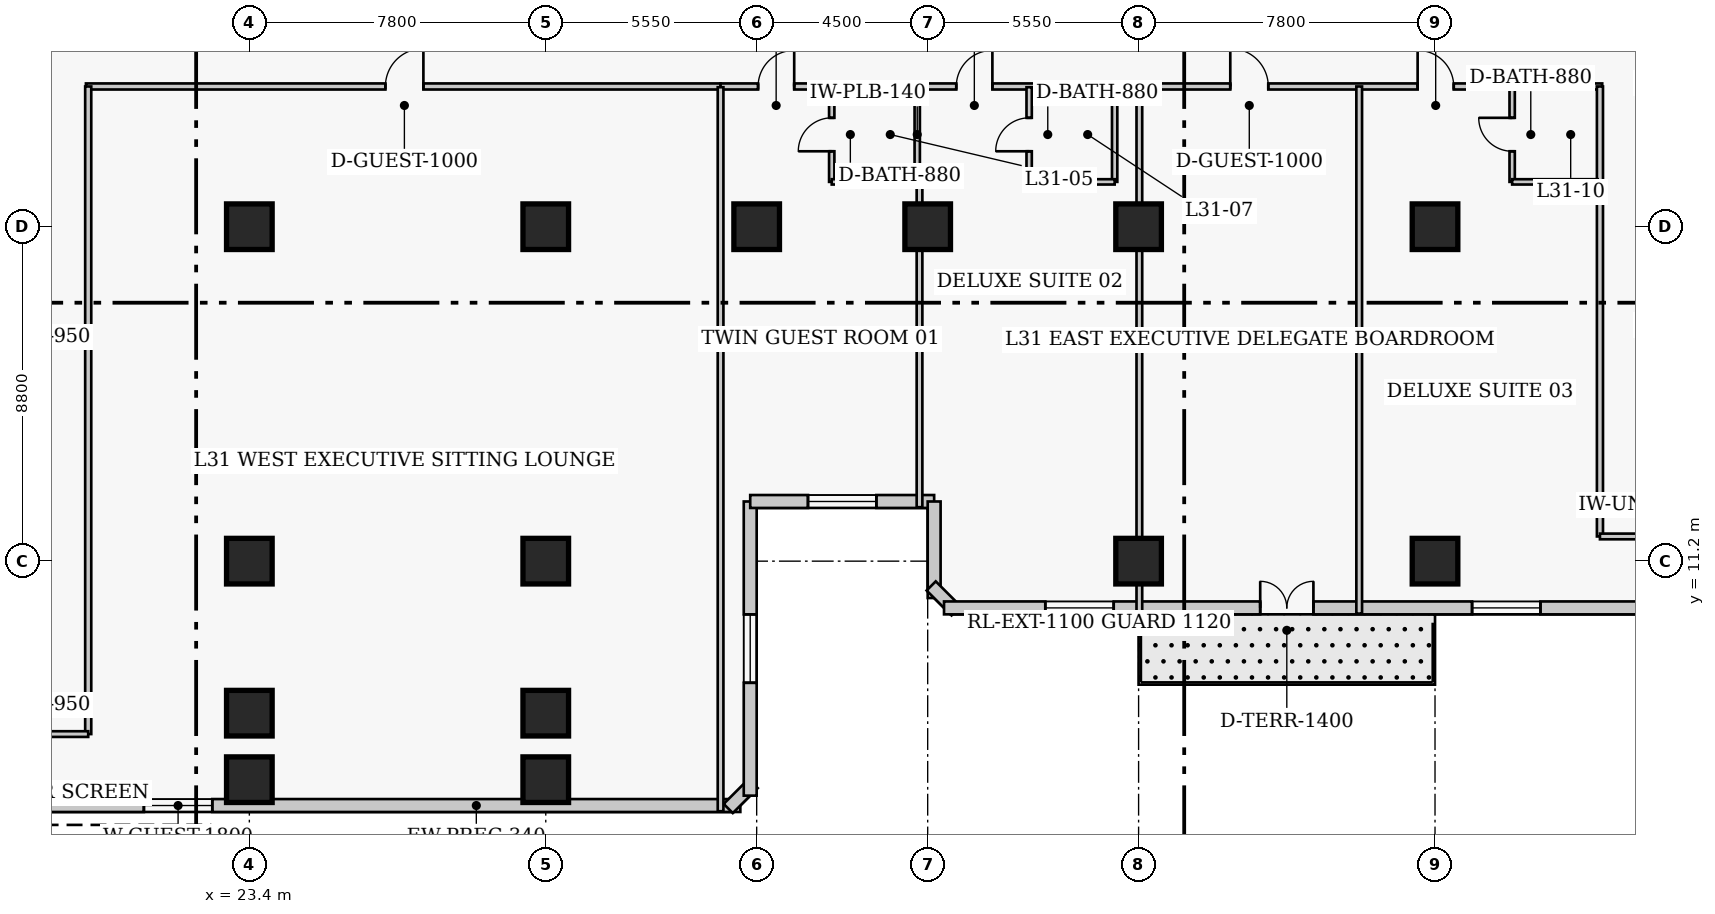
"""IFC4 building model, lengths in metres.
Left out: names, types, materials, properties, quantities, classifications, styles, units other than length and angle.
Written with IfcOpenShell. Run it as: python <this file> out.ifc"""

import sys

from ifc_helpers import new_model, si_unit, direction, frame, frame_2d, origin, origin_2d, place, context, subcontext, project, spatial, rectangle, extrude, element, fill, save


model = new_model("IFC4")
c1 = context("Model", 3, precision=1e-05, world=origin(), true_north=direction((0.0, 1.0)))
c2 = subcontext(c1, "Body", "Model", "MODEL_VIEW")
j1 = project(units=[si_unit("LENGTHUNIT", "METRE"), si_unit("PLANEANGLEUNIT", "RADIAN")], contexts=[c1])
p1 = place(None, origin())
s1 = spatial("IfcSite", under=j1, at=p1, CompositionType="ELEMENT")
p2 = place(p1, origin())
s2 = spatial("IfcBuilding", under=s1, at=p2, CompositionType="ELEMENT")
p3 = place(p2, frame((0.0, 0.0, 126.0)))
s3 = spatial("IfcBuildingStorey", under=s2, at=p3, CompositionType="ELEMENT", Elevation=126.0)
for number, where, z_axis, x_axis in (
    (1, (23.4, 11.2, 0.0), (0.0, 0.0, 1.0), (1.0, 0.0, 0.0)),
    (2, (23.4, 20.0, 0.0), (0.0, 0.0, 1.0), (1.0, 0.0, 0.0)),
    (3, (31.2, 11.2, 0.0), (0.0, 0.0, 1.0), (1.0, 0.0, 0.0)),
    (4, (31.2, 20.0, 0.0), (0.0, 0.0, 1.0), (1.0, 0.0, 0.0)),
    (5, (36.75, 20.0, 0.0), (0.0, 0.0, 1.0), (1.0, 0.0, 0.0)),
    (6, (41.25, 20.0, 0.0), (0.0, 0.0, 1.0), (1.0, 0.0, 0.0)),
    (7, (46.8, 11.2, 0.0), (0.0, 0.0, 1.0), (1.0, 0.0, 0.0)),
    (8, (46.8, 20.0, 0.0), (0.0, 0.0, 1.0), (1.0, 0.0, 0.0)),
    (9, (54.6, 11.2, 0.0), (0.0, 0.0, 1.0), (1.0, 0.0, 0.0)),
    (10, (54.6, 20.0, 0.0), (0.0, 0.0, 1.0), (1.0, 0.0, 0.0)),
    (11, (23.4, 7.2, 0.0), (0.0, 0.0, 1.0), (1.0, 0.0, 0.0)),
    (12, (31.2, 7.2, 0.0), (0.0, 0.0, 1.0), (1.0, 0.0, 0.0)),
    (13, (23.4, 5.45, 0.0), (0.0, 0.0, 1.0), (1.0, 0.0, 0.0)),
    (14, (31.2, 5.45, 0.0), (0.0, 0.0, 1.0), (1.0, 0.0, 0.0)),
):
    element("IfcColumn", number, at=place(p3, frame(where, z_axis=z_axis, x_axis=x_axis)), inside=s3, PredefinedType="COLUMN", context=c2, shape_type="SweptSolid", body=[
        extrude(rectangle(XDim=1.2, YDim=1.2, at=origin_2d()), origin(), (0.0, 0.0, 1.0), 3.8),
    ])
p4 = place(p3, frame((8.03, 4.77, 0.0), z_axis=(0.0, 0.0, 1.0), x_axis=(1.0, 0.0, 0.0)))
e15 = element("IfcWall", 15, at=p4, inside=s3, PredefinedType="SOLIDWALL", context=c2, shape_type="SweptSolid", body=[
    extrude(rectangle(XDim=28.29, YDim=0.34, at=frame_2d((14.145, 0.0))), origin(), (0.0, 0.0, 1.0), 3.46),
])
p5 = place(p4, frame((12.595, 0.0, 0.85)))
e16 = element("IfcOpeningElement", 16, at=p5, cuts=e15, PredefinedType="OPENING", context=c2, shape_type="SweptSolid", body=[
    extrude(rectangle(XDim=1.8, YDim=1.8, at=frame_2d((0.9, 0.9))), frame((0.0, 0.18, 0.0), z_axis=(0.0, -1.0, 0.0), x_axis=(1.0, 0.0, 0.0)), (0.0, 0.0, 1.0), 0.36),
])
p6 = place(p3, frame((36.001, 4.692, 0.0), z_axis=(0.0, 0.0, 1.0), x_axis=(0.707238225886, 0.706975312048, 0.0)))
e17 = element("IfcWall", 17, at=p6, inside=s3, PredefinedType="SOLIDWALL", context=c2, shape_type="SweptSolid", body=[
    extrude(rectangle(XDim=0.929, YDim=0.34, at=frame_2d((0.464, 0.0))), origin(), (0.0, 0.0, 1.0), 3.46),
])
p7 = place(p3, frame((36.58, 5.03, 0.0), z_axis=(0.0, 0.0, 1.0), x_axis=(0.0, 1.0, 0.0)))
e18 = element("IfcWall", 18, at=p7, inside=s3, PredefinedType="SOLIDWALL", context=c2, shape_type="SweptSolid", body=[
    extrude(rectangle(XDim=7.74, YDim=0.34, at=frame_2d((3.87, 0.0))), origin(), (0.0, 0.0, 1.0), 3.46),
])
p8 = place(p7, frame((2.97, 0.0, 0.85)))
e19 = element("IfcOpeningElement", 19, at=p8, cuts=e18, PredefinedType="OPENING", context=c2, shape_type="SweptSolid", body=[
    extrude(rectangle(XDim=1.8, YDim=1.8, at=frame_2d((0.9, 0.9))), frame((0.0, 0.18, 0.0), z_axis=(0.0, -1.0, 0.0), x_axis=(1.0, 0.0, 0.0)), (0.0, 0.0, 1.0), 0.36),
])
p9 = place(p3, frame((36.58, 12.77, 0.0), z_axis=(0.0, 0.0, 1.0), x_axis=(1.0, 0.0, 0.0)))
e20 = element("IfcWall", 20, at=p9, inside=s3, PredefinedType="SOLIDWALL", context=c2, shape_type="SweptSolid", body=[
    extrude(rectangle(XDim=4.84, YDim=0.34, at=frame_2d((2.42, 0.0))), origin(), (0.0, 0.0, 1.0), 3.46),
])
p10 = place(p9, frame((1.52, 0.0, 0.85)))
e21 = element("IfcOpeningElement", 21, at=p10, cuts=e20, PredefinedType="OPENING", context=c2, shape_type="SweptSolid", body=[
    extrude(rectangle(XDim=1.8, YDim=1.8, at=frame_2d((0.9, 0.9))), frame((0.0, 0.18, 0.0), z_axis=(0.0, -1.0, 0.0), x_axis=(1.0, 0.0, 0.0)), (0.0, 0.0, 1.0), 0.36),
])
p11 = place(p3, frame((41.42, 12.77, 0.0), z_axis=(0.0, 0.0, 1.0), x_axis=(0.0, -1.0, 0.0)))
e22 = element("IfcWall", 22, at=p11, inside=s3, PredefinedType="SOLIDWALL", context=c2, shape_type="SweptSolid", body=[
    extrude(rectangle(XDim=2.54, YDim=0.34, at=frame_2d((1.27, 0.0))), origin(), (0.0, 0.0, 1.0), 3.46),
])
p12 = place(p3, frame((41.342, 10.549, 0.0), z_axis=(0.0, 0.0, 1.0), x_axis=(0.707106781187, -0.707106781187, 0.0)))
e23 = element("IfcWall", 23, at=p12, inside=s3, PredefinedType="SOLIDWALL", context=c2, shape_type="SweptSolid", body=[
    extrude(rectangle(XDim=0.929, YDim=0.34, at=frame_2d((0.464, 0.0))), origin(), (0.0, 0.0, 1.0), 3.46),
])
p13 = place(p3, frame((41.68, 9.97, 0.0), z_axis=(0.0, 0.0, 1.0), x_axis=(1.0, 0.0, 0.0)))
e24 = element("IfcWall", 24, at=p13, inside=s3, PredefinedType="SOLIDWALL", context=c2, shape_type="SweptSolid", body=[
    extrude(rectangle(XDim=28.29, YDim=0.34, at=frame_2d((14.145, 0.0))), origin(), (0.0, 0.0, 1.0), 3.46),
])
p14 = place(p13, frame((8.32, 0.0, 0.0)))
e25 = element("IfcOpeningElement", 25, at=p14, cuts=e24, PredefinedType="OPENING", context=c2, shape_type="SweptSolid", body=[
    extrude(rectangle(XDim=1.4, YDim=2.15, at=frame_2d((0.7, 1.075))), frame((0.0, 0.18, 0.0), z_axis=(0.0, -1.0, 0.0), x_axis=(1.0, 0.0, 0.0)), (0.0, 0.0, 1.0), 0.36),
])
p15 = place(p13, frame((2.665, 0.0, 0.85)))
e26 = element("IfcOpeningElement", 26, at=p15, cuts=e24, PredefinedType="OPENING", context=c2, shape_type="SweptSolid", body=[
    extrude(rectangle(XDim=1.8, YDim=1.8, at=frame_2d((0.9, 0.9))), frame((0.0, 0.18, 0.0), z_axis=(0.0, -1.0, 0.0), x_axis=(1.0, 0.0, 0.0)), (0.0, 0.0, 1.0), 0.36),
])
p16 = place(p13, frame((13.895, 0.0, 0.85)))
e27 = element("IfcOpeningElement", 27, at=p16, cuts=e24, PredefinedType="OPENING", context=c2, shape_type="SweptSolid", body=[
    extrude(rectangle(XDim=1.8, YDim=1.8, at=frame_2d((0.9, 0.9))), frame((0.0, 0.18, 0.0), z_axis=(0.0, -1.0, 0.0), x_axis=(1.0, 0.0, 0.0)), (0.0, 0.0, 1.0), 0.36),
])
p17 = place(p3, frame((19.1, 23.69, 0.0), z_axis=(0.0, 0.0, 1.0), x_axis=(1.0, 0.0, 0.0)))
e28 = element("IfcWall", 28, at=p17, inside=s3, PredefinedType="PARTITIONING", context=c2, shape_type="SweptSolid", body=[
    extrude(rectangle(XDim=16.7, YDim=0.16, at=frame_2d((8.35, 0.0))), origin(), (0.0, 0.0, 1.0), 3.46),
])
p18 = place(p17, frame((7.88, 0.0, 0.0)))
e29 = element("IfcOpeningElement", 29, at=p18, cuts=e28, PredefinedType="OPENING", context=c2, shape_type="SweptSolid", body=[
    extrude(rectangle(XDim=1.0, YDim=2.15, at=frame_2d((0.5, 1.075))), frame((0.0, 0.09, 0.0), z_axis=(0.0, -1.0, 0.0), x_axis=(1.0, 0.0, 0.0)), (0.0, 0.0, 1.0), 0.18),
])
p19 = place(p3, frame((35.8, 23.69, 0.0), z_axis=(0.0, 0.0, 1.0), x_axis=(1.0, 0.0, 0.0)))
e30 = element("IfcWall", 30, at=p19, inside=s3, PredefinedType="PARTITIONING", context=c2, shape_type="SweptSolid", body=[
    extrude(rectangle(XDim=23.2, YDim=0.16, at=frame_2d((11.6, 0.0))), origin(), (0.0, 0.0, 1.0), 3.46),
])
p20 = place(p19, frame((0.988, 0.0, 0.0)))
e31 = element("IfcOpeningElement", 31, at=p20, cuts=e30, PredefinedType="OPENING", context=c2, shape_type="SweptSolid", body=[
    extrude(rectangle(XDim=0.95, YDim=2.1, at=frame_2d((0.475, 1.05))), frame((0.0, 0.09, 0.0), z_axis=(0.0, -1.0, 0.0), x_axis=(1.0, 0.0, 0.0)), (0.0, 0.0, 1.0), 0.18),
])
p21 = place(p19, frame((6.202, 0.0, 0.0)))
e32 = element("IfcOpeningElement", 32, at=p21, cuts=e30, PredefinedType="OPENING", context=c2, shape_type="SweptSolid", body=[
    extrude(rectangle(XDim=0.95, YDim=2.1, at=frame_2d((0.475, 1.05))), frame((0.0, 0.09, 0.0), z_axis=(0.0, -1.0, 0.0), x_axis=(1.0, 0.0, 0.0)), (0.0, 0.0, 1.0), 0.18),
])
p22 = place(p19, frame((13.413, 0.0, 0.0)))
e33 = element("IfcOpeningElement", 33, at=p22, cuts=e30, PredefinedType="OPENING", context=c2, shape_type="SweptSolid", body=[
    extrude(rectangle(XDim=1.0, YDim=2.15, at=frame_2d((0.5, 1.075))), frame((0.0, 0.09, 0.0), z_axis=(0.0, -1.0, 0.0), x_axis=(1.0, 0.0, 0.0)), (0.0, 0.0, 1.0), 0.18),
])
p23 = place(p19, frame((18.343, 0.0, 0.0)))
e34 = element("IfcOpeningElement", 34, at=p23, cuts=e30, PredefinedType="OPENING", context=c2, shape_type="SweptSolid", body=[
    extrude(rectangle(XDim=0.95, YDim=2.1, at=frame_2d((0.475, 1.05))), frame((0.0, 0.09, 0.0), z_axis=(0.0, -1.0, 0.0), x_axis=(1.0, 0.0, 0.0)), (0.0, 0.0, 1.0), 0.18),
])
p24 = place(p3, frame((19.16, 6.65, 0.0), z_axis=(0.0, 0.0, 1.0), x_axis=(0.0, 1.0, 0.0)))
e35 = element("IfcWall", 35, at=p24, inside=s3, PredefinedType="PARTITIONING", context=c2, shape_type="SweptSolid", body=[
    extrude(rectangle(XDim=17.04, YDim=0.16, at=frame_2d((8.52, 0.0))), origin(), (0.0, 0.0, 1.0), 3.46),
])
p25 = place(p3, frame((58.94, 11.85, 0.0), z_axis=(0.0, 0.0, 1.0), x_axis=(0.0, 1.0, 0.0)))
e36 = element("IfcWall", 36, at=p25, inside=s3, PredefinedType="PARTITIONING", context=c2, shape_type="SweptSolid", body=[
    extrude(rectangle(XDim=11.84, YDim=0.16, at=frame_2d((5.92, 0.0))), origin(), (0.0, 0.0, 1.0), 3.46),
])
for number, where, z_axis, x_axis in (
    (37, (58.94, 11.85, 0.0), (0.0, 0.0, 1.0), (1.0, 0.0, 0.0)),
    (38, (16.94, 6.65, 0.0), (0.0, 0.0, 1.0), (1.0, 0.0, 0.0)),
):
    element("IfcWall", number, at=place(p3, frame(where, z_axis=z_axis, x_axis=x_axis)), inside=s3, PredefinedType="PARTITIONING", context=c2, shape_type="SweptSolid", body=[
        extrude(rectangle(XDim=2.22, YDim=0.15, at=frame_2d((1.11, 0.0))), origin(), (0.0, 0.0, 1.0), 3.46),
    ])
p26 = place(p3, frame((35.8, 4.62, 0.0), z_axis=(0.0, 0.0, 1.0), x_axis=(0.0, 1.0, 0.0)))
e39 = element("IfcWall", 39, at=p26, inside=s3, PredefinedType="PARTITIONING", context=c2, shape_type="SweptSolid", body=[
    extrude(rectangle(XDim=19.05, YDim=0.15, at=frame_2d((9.525, 0.0))), origin(), (0.0, 0.0, 1.0), 3.46),
])
p27 = place(p3, frame((38.725, 21.18, 0.0), z_axis=(0.0, 0.0, 1.0), x_axis=(0.0, 1.0, 0.0)))
e40 = element("IfcWall", 40, at=p27, inside=s3, PredefinedType="PLUMBINGWALL", context=c2, shape_type="SweptSolid", body=[
    extrude(rectangle(XDim=2.49, YDim=0.14, at=frame_2d((1.245, 0.0))), origin(), (0.0, 0.0, 1.0), 3.46),
])
p28 = place(p27, frame((0.805, 0.0, 0.0)))
e41 = element("IfcOpeningElement", 41, at=p28, cuts=e40, PredefinedType="OPENING", context=c2, shape_type="SweptSolid", body=[
    extrude(rectangle(XDim=0.88, YDim=2.05, at=frame_2d((0.44, 1.025))), frame((0.0, 0.08, 0.0), z_axis=(0.0, -1.0, 0.0), x_axis=(1.0, 0.0, 0.0)), (0.0, 0.0, 1.0), 0.16),
])
p29 = place(p3, frame((40.975, 21.18, 0.0), z_axis=(0.0, 0.0, 1.0), x_axis=(0.0, 1.0, 0.0)))
e42 = element("IfcWall", 42, at=p29, inside=s3, PredefinedType="PLUMBINGWALL", context=c2, shape_type="SweptSolid", body=[
    extrude(rectangle(XDim=2.49, YDim=0.14, at=frame_2d((1.245, 0.0))), origin(), (0.0, 0.0, 1.0), 3.46),
])
p30 = place(p3, frame((38.725, 21.18, 0.0), z_axis=(0.0, 0.0, 1.0), x_axis=(1.0, 0.0, 0.0)))
e43 = element("IfcWall", 43, at=p30, inside=s3, PredefinedType="PLUMBINGWALL", context=c2, shape_type="SweptSolid", body=[
    extrude(rectangle(XDim=2.25, YDim=0.14, at=frame_2d((1.125, 0.0))), origin(), (0.0, 0.0, 1.0), 3.46),
])
p31 = place(p3, frame((41.035, 12.62, 0.0), z_axis=(0.0, 0.0, 1.0), x_axis=(0.0, 1.0, 0.0)))
e44 = element("IfcWall", 44, at=p31, inside=s3, PredefinedType="PARTITIONING", context=c2, shape_type="SweptSolid", body=[
    extrude(rectangle(XDim=8.56, YDim=0.15, at=frame_2d((4.28, 0.0))), origin(), (0.0, 0.0, 1.0), 3.46),
])
p32 = place(p3, frame((43.92, 21.18, 0.0), z_axis=(0.0, 0.0, 1.0), x_axis=(0.0, 1.0, 0.0)))
e45 = element("IfcWall", 45, at=p32, inside=s3, PredefinedType="PLUMBINGWALL", context=c2, shape_type="SweptSolid", body=[
    extrude(rectangle(XDim=2.49, YDim=0.14, at=frame_2d((1.245, 0.0))), origin(), (0.0, 0.0, 1.0), 3.46),
])
p33 = place(p32, frame((0.805, 0.0, 0.0)))
e46 = element("IfcOpeningElement", 46, at=p33, cuts=e45, PredefinedType="OPENING", context=c2, shape_type="SweptSolid", body=[
    extrude(rectangle(XDim=0.88, YDim=2.05, at=frame_2d((0.44, 1.025))), frame((0.0, 0.08, 0.0), z_axis=(0.0, -1.0, 0.0), x_axis=(1.0, 0.0, 0.0)), (0.0, 0.0, 1.0), 0.16),
])
p34 = place(p3, frame((46.17, 21.18, 0.0), z_axis=(0.0, 0.0, 1.0), x_axis=(0.0, 1.0, 0.0)))
e47 = element("IfcWall", 47, at=p34, inside=s3, PredefinedType="PLUMBINGWALL", context=c2, shape_type="SweptSolid", body=[
    extrude(rectangle(XDim=2.49, YDim=0.14, at=frame_2d((1.245, 0.0))), origin(), (0.0, 0.0, 1.0), 3.46),
])
p35 = place(p3, frame((43.92, 21.18, 0.0), z_axis=(0.0, 0.0, 1.0), x_axis=(1.0, 0.0, 0.0)))
e48 = element("IfcWall", 48, at=p35, inside=s3, PredefinedType="PLUMBINGWALL", context=c2, shape_type="SweptSolid", body=[
    extrude(rectangle(XDim=2.25, YDim=0.14, at=frame_2d((1.125, 0.0))), origin(), (0.0, 0.0, 1.0), 3.46),
])
p36 = place(p3, frame((46.82, 9.82, 0.0), z_axis=(0.0, 0.0, 1.0), x_axis=(0.0, 1.0, 0.0)))
e49 = element("IfcWall", 49, at=p36, inside=s3, PredefinedType="PARTITIONING", context=c2, shape_type="SweptSolid", body=[
    extrude(rectangle(XDim=13.87, YDim=0.15, at=frame_2d((6.935, 0.0))), origin(), (0.0, 0.0, 1.0), 2.599),
])
p37 = place(p3, frame((52.605, 9.82, 0.0), z_axis=(0.0, 0.0, 1.0), x_axis=(0.0, 1.0, 0.0)))
e50 = element("IfcWall", 50, at=p37, inside=s3, PredefinedType="PARTITIONING", context=c2, shape_type="SweptSolid", body=[
    extrude(rectangle(XDim=13.87, YDim=0.15, at=frame_2d((6.935, 0.0))), origin(), (0.0, 0.0, 1.0), 3.46),
])
p38 = place(p3, frame((56.63, 21.18, 0.0), z_axis=(0.0, 0.0, 1.0), x_axis=(0.0, 1.0, 0.0)))
e51 = element("IfcWall", 51, at=p38, inside=s3, PredefinedType="PLUMBINGWALL", context=c2, shape_type="SweptSolid", body=[
    extrude(rectangle(XDim=2.49, YDim=0.14, at=frame_2d((1.245, 0.0))), origin(), (0.0, 0.0, 1.0), 3.46),
])
p39 = place(p38, frame((0.805, 0.0, 0.0)))
e52 = element("IfcOpeningElement", 52, at=p39, cuts=e51, PredefinedType="OPENING", context=c2, shape_type="SweptSolid", body=[
    extrude(rectangle(XDim=0.88, YDim=2.05, at=frame_2d((0.44, 1.025))), frame((0.0, 0.08, 0.0), z_axis=(0.0, -1.0, 0.0), x_axis=(1.0, 0.0, 0.0)), (0.0, 0.0, 1.0), 0.16),
])
p40 = place(p3, frame((56.63, 21.18, 0.0), z_axis=(0.0, 0.0, 1.0), x_axis=(1.0, 0.0, 0.0)))
e53 = element("IfcWall", 53, at=p40, inside=s3, PredefinedType="PLUMBINGWALL", context=c2, shape_type="SweptSolid", body=[
    extrude(rectangle(XDim=2.25, YDim=0.14, at=frame_2d((1.125, 0.0))), origin(), (0.0, 0.0, 1.0), 3.46),
])
p41 = place(p5, origin())
e54 = element("IfcWindow", 54, at=p41, inside=s3, PartitioningType="SINGLE_PANEL", PredefinedType="WINDOW", context=c2, shape_type="SweptSolid", body=[
    extrude(rectangle(XDim=1.8, YDim=1.8, at=frame_2d((0.9, 0.9))), frame((0.0, 0.03, 0.0), z_axis=(0.0, -1.0, 0.0), x_axis=(1.0, 0.0, 0.0)), (0.0, 0.0, 1.0), 0.06),
])
fill(e16, e54)
p42 = place(p8, origin())
e55 = element("IfcWindow", 55, at=p42, inside=s3, PartitioningType="SINGLE_PANEL", PredefinedType="WINDOW", context=c2, shape_type="SweptSolid", body=[
    extrude(rectangle(XDim=1.8, YDim=1.8, at=frame_2d((0.9, 0.9))), frame((0.0, 0.03, 0.0), z_axis=(0.0, -1.0, 0.0), x_axis=(1.0, 0.0, 0.0)), (0.0, 0.0, 1.0), 0.06),
])
fill(e19, e55)
p43 = place(p10, origin())
e56 = element("IfcWindow", 56, at=p43, inside=s3, PartitioningType="SINGLE_PANEL", PredefinedType="WINDOW", context=c2, shape_type="SweptSolid", body=[
    extrude(rectangle(XDim=1.8, YDim=1.8, at=frame_2d((0.9, 0.9))), frame((0.0, 0.03, 0.0), z_axis=(0.0, -1.0, 0.0), x_axis=(1.0, 0.0, 0.0)), (0.0, 0.0, 1.0), 0.06),
])
fill(e21, e56)
p44 = place(p14, origin())
e57 = element("IfcDoor", 57, at=p44, inside=s3, OperationType="DOUBLE_DOOR_SINGLE_SWING", PredefinedType="DOOR", context=c2, shape_type="SweptSolid", body=[
    extrude(rectangle(XDim=1.4, YDim=2.15, at=frame_2d((0.7, 1.075))), frame((0.0, 0.025, 0.0), z_axis=(0.0, -1.0, 0.0), x_axis=(1.0, 0.0, 0.0)), (0.0, 0.0, 1.0), 0.05),
])
fill(e25, e57)
p45 = place(p15, origin())
e58 = element("IfcWindow", 58, at=p45, inside=s3, PartitioningType="SINGLE_PANEL", PredefinedType="WINDOW", context=c2, shape_type="SweptSolid", body=[
    extrude(rectangle(XDim=1.8, YDim=1.8, at=frame_2d((0.9, 0.9))), frame((0.0, 0.03, 0.0), z_axis=(0.0, -1.0, 0.0), x_axis=(1.0, 0.0, 0.0)), (0.0, 0.0, 1.0), 0.06),
])
fill(e26, e58)
p46 = place(p16, origin())
e59 = element("IfcWindow", 59, at=p46, inside=s3, PartitioningType="SINGLE_PANEL", PredefinedType="WINDOW", context=c2, shape_type="SweptSolid", body=[
    extrude(rectangle(XDim=1.8, YDim=1.8, at=frame_2d((0.9, 0.9))), frame((0.0, 0.03, 0.0), z_axis=(0.0, -1.0, 0.0), x_axis=(1.0, 0.0, 0.0)), (0.0, 0.0, 1.0), 0.06),
])
fill(e27, e59)
p47 = place(p18, origin())
e60 = element("IfcDoor", 60, at=p47, inside=s3, OperationType="SINGLE_SWING_RIGHT", PredefinedType="DOOR", context=c2, shape_type="SweptSolid", body=[
    extrude(rectangle(XDim=1.0, YDim=2.15, at=frame_2d((0.5, 1.075))), frame((0.0, 0.025, 0.0), z_axis=(0.0, -1.0, 0.0), x_axis=(1.0, 0.0, 0.0)), (0.0, 0.0, 1.0), 0.05),
])
fill(e29, e60)
p48 = place(p28, origin())
e61 = element("IfcDoor", 61, at=p48, inside=s3, OperationType="SINGLE_SWING_LEFT", PredefinedType="DOOR", context=c2, shape_type="SweptSolid", body=[
    extrude(rectangle(XDim=0.88, YDim=2.05, at=frame_2d((0.44, 1.025))), frame((0.0, 0.025, 0.0), z_axis=(0.0, -1.0, 0.0), x_axis=(1.0, 0.0, 0.0)), (0.0, 0.0, 1.0), 0.05),
])
fill(e41, e61)
p49 = place(p20, origin())
e62 = element("IfcDoor", 62, at=p49, inside=s3, OperationType="SINGLE_SWING_RIGHT", PredefinedType="DOOR", context=c2, shape_type="SweptSolid", body=[
    extrude(rectangle(XDim=0.95, YDim=2.1, at=frame_2d((0.475, 1.05))), frame((0.0, 0.025, 0.0), z_axis=(0.0, -1.0, 0.0), x_axis=(1.0, 0.0, 0.0)), (0.0, 0.0, 1.0), 0.05),
])
fill(e31, e62)
p50 = place(p33, origin())
e63 = element("IfcDoor", 63, at=p50, inside=s3, OperationType="SINGLE_SWING_LEFT", PredefinedType="DOOR", context=c2, shape_type="SweptSolid", body=[
    extrude(rectangle(XDim=0.88, YDim=2.05, at=frame_2d((0.44, 1.025))), frame((0.0, 0.025, 0.0), z_axis=(0.0, -1.0, 0.0), x_axis=(1.0, 0.0, 0.0)), (0.0, 0.0, 1.0), 0.05),
])
fill(e46, e63)
p51 = place(p21, origin())
e64 = element("IfcDoor", 64, at=p51, inside=s3, OperationType="SINGLE_SWING_RIGHT", PredefinedType="DOOR", context=c2, shape_type="SweptSolid", body=[
    extrude(rectangle(XDim=0.95, YDim=2.1, at=frame_2d((0.475, 1.05))), frame((0.0, 0.025, 0.0), z_axis=(0.0, -1.0, 0.0), x_axis=(1.0, 0.0, 0.0)), (0.0, 0.0, 1.0), 0.05),
])
fill(e32, e64)
p52 = place(p22, origin())
e65 = element("IfcDoor", 65, at=p52, inside=s3, OperationType="SINGLE_SWING_LEFT", PredefinedType="DOOR", context=c2, shape_type="SweptSolid", body=[
    extrude(rectangle(XDim=1.0, YDim=2.15, at=frame_2d((0.5, 1.075))), frame((0.0, 0.025, 0.0), z_axis=(0.0, -1.0, 0.0), x_axis=(1.0, 0.0, 0.0)), (0.0, 0.0, 1.0), 0.05),
])
fill(e33, e65)
p53 = place(p39, origin())
e66 = element("IfcDoor", 66, at=p53, inside=s3, OperationType="SINGLE_SWING_RIGHT", PredefinedType="DOOR", context=c2, shape_type="SweptSolid", body=[
    extrude(rectangle(XDim=0.88, YDim=2.05, at=frame_2d((0.44, 1.025))), frame((0.0, 0.025, 0.0), z_axis=(0.0, -1.0, 0.0), x_axis=(1.0, 0.0, 0.0)), (0.0, 0.0, 1.0), 0.05),
])
fill(e52, e66)
p54 = place(p23, origin())
e67 = element("IfcDoor", 67, at=p54, inside=s3, OperationType="SINGLE_SWING_LEFT", PredefinedType="DOOR", context=c2, shape_type="SweptSolid", body=[
    extrude(rectangle(XDim=0.95, YDim=2.1, at=frame_2d((0.475, 1.05))), frame((0.0, 0.025, 0.0), z_axis=(0.0, -1.0, 0.0), x_axis=(1.0, 0.0, 0.0)), (0.0, 0.0, 1.0), 0.05),
])
fill(e34, e67)
save(model, sys.argv[1])
